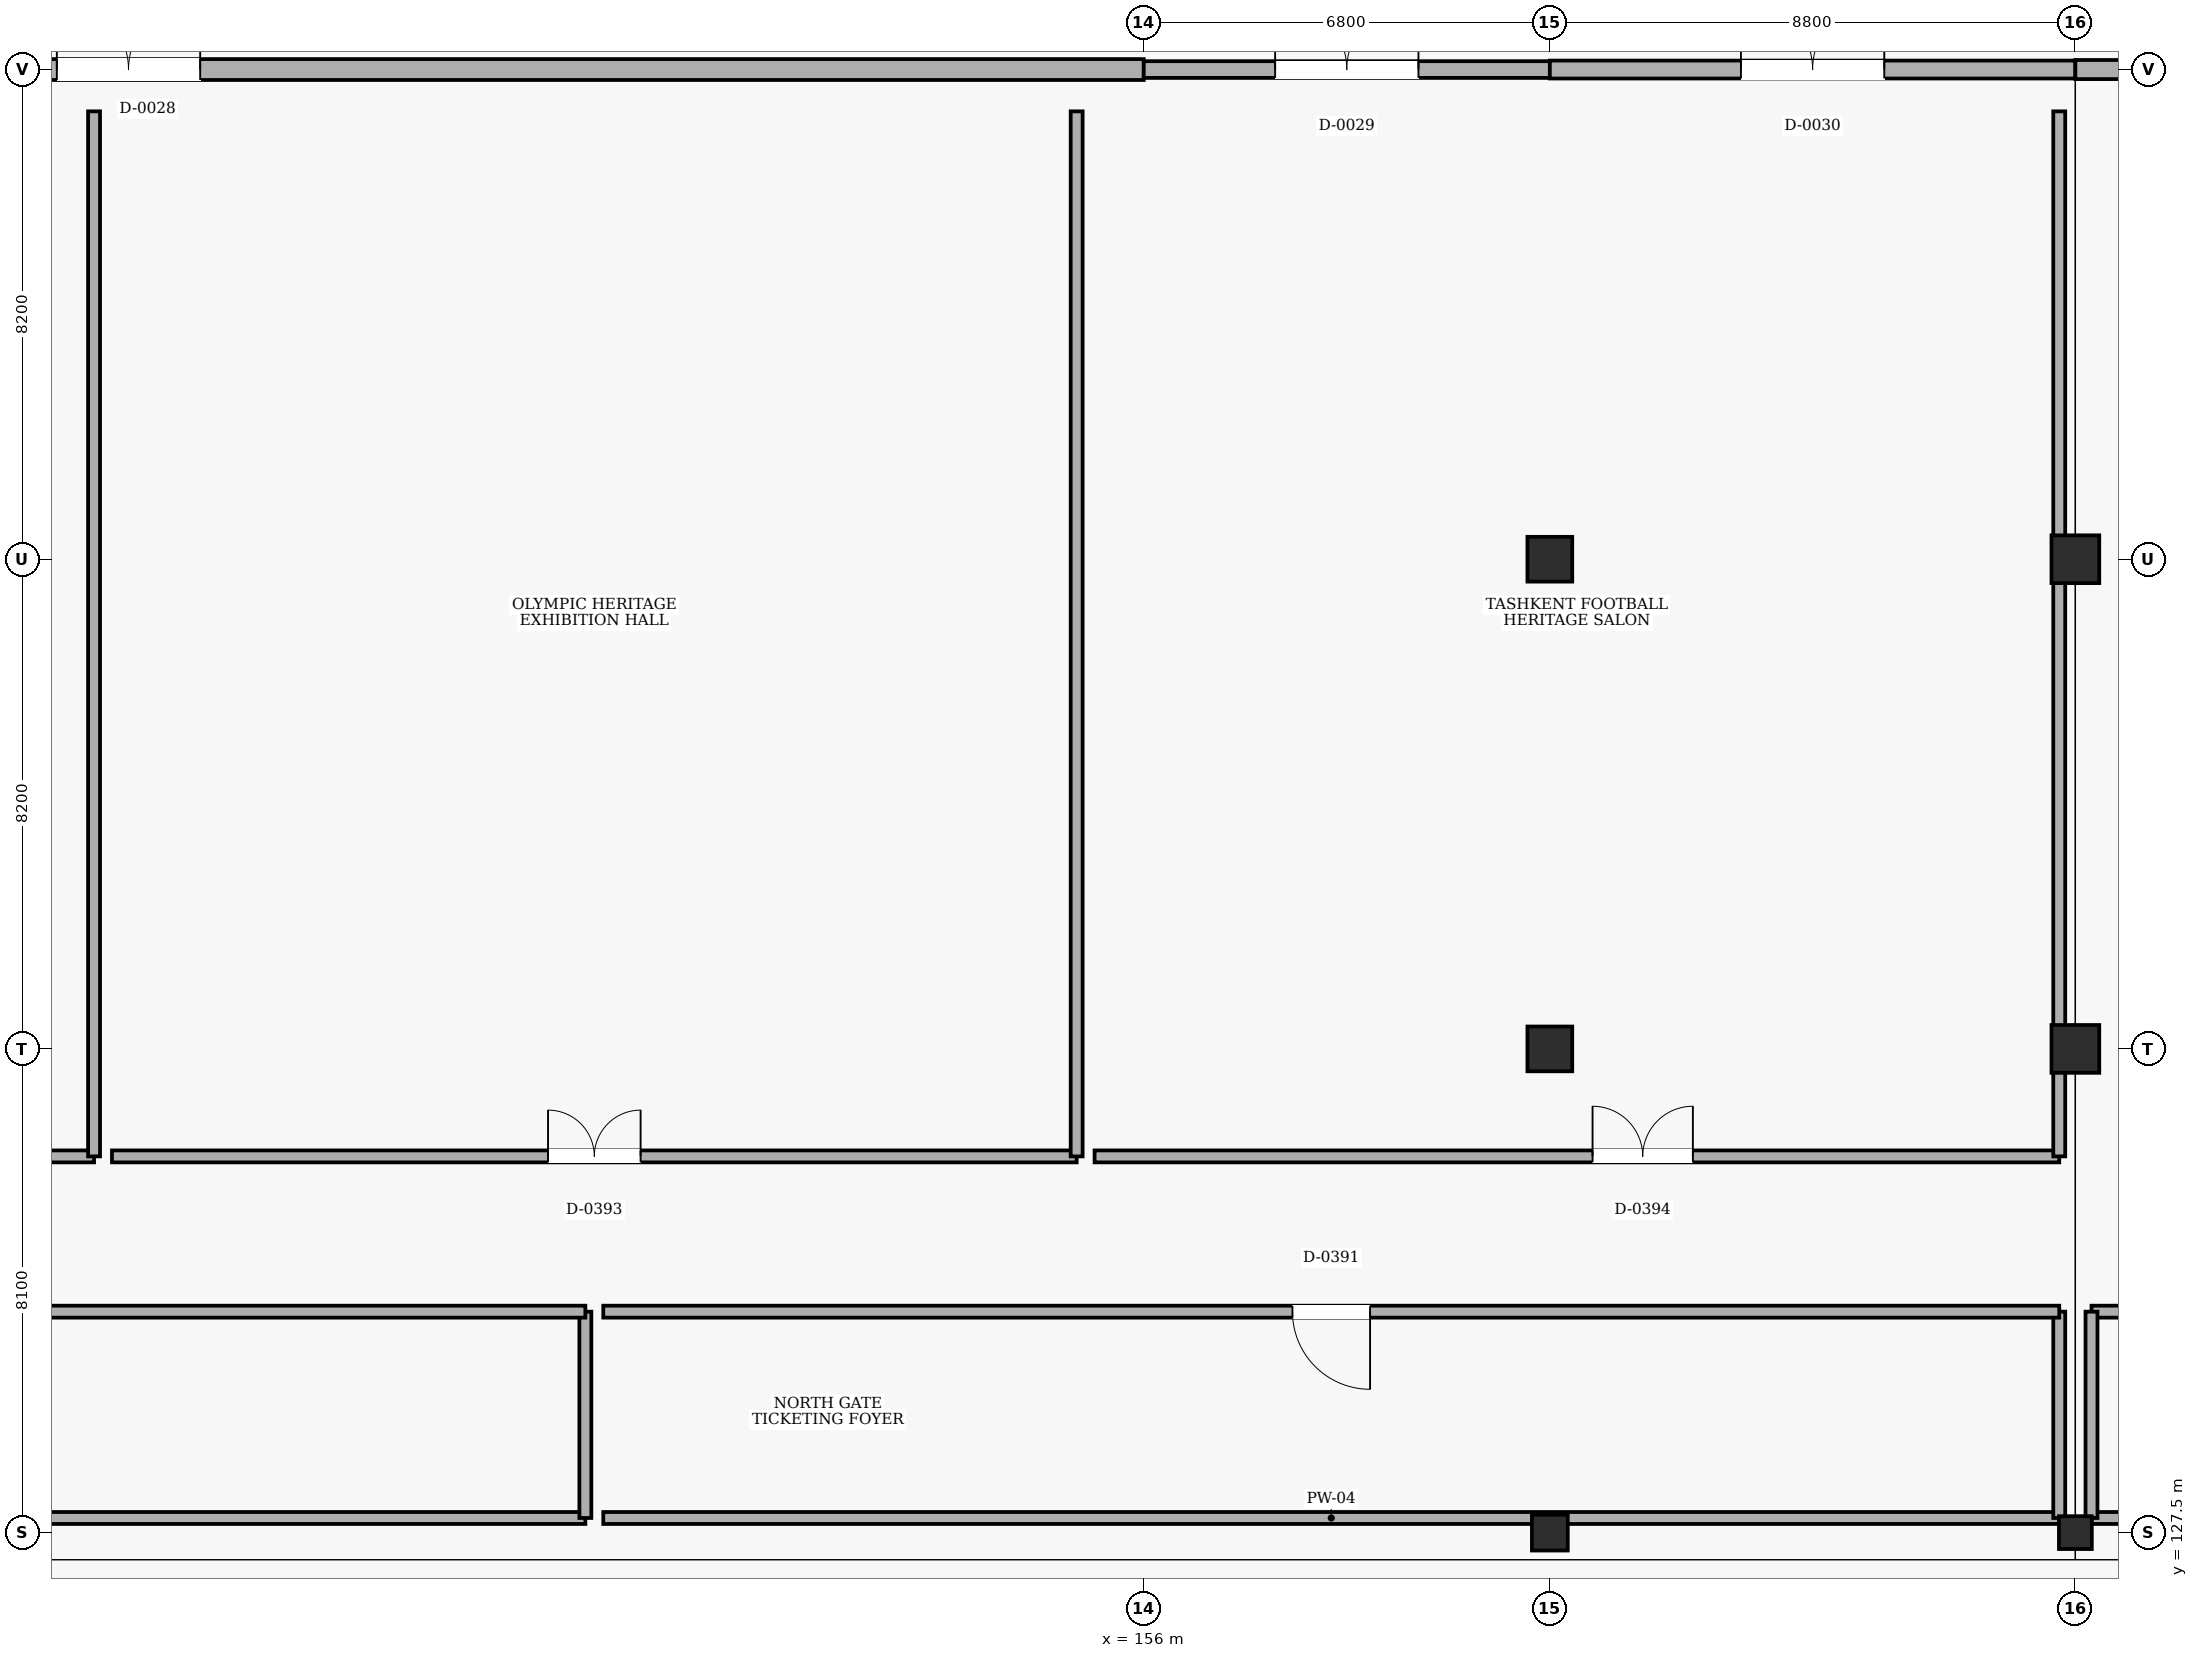
"""IFC4 building model, lengths in metres.
Left out: names, types, materials, properties, quantities, classifications, styles, units other than length and angle.
Written with IfcOpenShell. Run it as: python <this file> out.ifc"""

import sys

from ifc_helpers import new_model, si_unit, direction, frame, frame_2d, origin, origin_2d, place, context, subcontext, project, spatial, rectangle, extrude, element, fill, save


model = new_model("IFC4")
c1 = context("Model", 3, precision=1e-05, world=origin(), true_north=direction((0.0, 1.0)))
c2 = subcontext(c1, "Body", "Model", "MODEL_VIEW")
j1 = project(units=[si_unit("LENGTHUNIT", "METRE"), si_unit("PLANEANGLEUNIT", "RADIAN")], contexts=[c1])
p1 = place(None, origin())
s1 = spatial("IfcSite", under=j1, at=p1, CompositionType="ELEMENT")
p2 = place(p1, origin())
s2 = spatial("IfcBuilding", under=s1, at=p2, CompositionType="ELEMENT")
p3 = place(p2, origin())
s3 = spatial("IfcBuildingStorey", under=s2, at=p3, CompositionType="ELEMENT", Elevation=0.0)
p4 = place(p3, frame((162.8, 127.5, 0.0), z_axis=(0.0, 0.0, 1.0), x_axis=(1.0, 0.0, 0.0)))
e1 = element("IfcColumn", 1, at=p4, inside=s3, PredefinedType="COLUMN", context=c2, shape_type="SweptSolid", body=[
    extrude(rectangle(XDim=0.6, YDim=0.6, at=origin_2d()), origin(), (0.0, 0.0, 1.0), 5.4),
])
for number, where, z_axis, x_axis in (
    (2, (162.8, 135.6, 0.0), (0.0, 0.0, 1.0), (1.0, 0.0, 0.0)),
    (3, (162.8, 143.8, 0.0), (0.0, 0.0, 1.0), (1.0, 0.0, 0.0)),
):
    element("IfcColumn", number, at=place(p3, frame(where, z_axis=z_axis, x_axis=x_axis)), inside=s3, PredefinedType="COLUMN", context=c2, shape_type="SweptSolid", body=[
        extrude(rectangle(XDim=0.75, YDim=0.75, at=origin_2d()), origin(), (0.0, 0.0, 1.0), 5.4),
    ])
p5 = place(p3, frame((171.6, 127.5, 0.0), z_axis=(0.0, 0.0, 1.0), x_axis=(1.0, 0.0, 0.0)))
e4 = element("IfcColumn", 4, at=p5, inside=s3, PredefinedType="COLUMN", context=c2, shape_type="SweptSolid", body=[
    extrude(rectangle(XDim=0.55, YDim=0.55, at=origin_2d()), origin(), (0.0, 0.0, 1.0), 5.4),
])
for number, where, z_axis, x_axis in (
    (5, (171.6, 135.6, 0.0), (0.0, 0.0, 1.0), (1.0, 0.0, 0.0)),
    (6, (171.6, 143.8, 0.0), (0.0, 0.0, 1.0), (1.0, 0.0, 0.0)),
):
    element("IfcColumn", number, at=place(p3, frame(where, z_axis=z_axis, x_axis=x_axis)), inside=s3, PredefinedType="COLUMN", context=c2, shape_type="SweptSolid", body=[
        extrude(rectangle(XDim=0.8, YDim=0.8, at=origin_2d()), origin(), (0.0, 0.0, 1.0), 5.4),
    ])
p6 = place(p3, frame((122.0, 152.0, 0.0), z_axis=(0.0, 0.0, 1.0), x_axis=(1.0, 0.0, 0.0)))
e7 = element("IfcWall", 7, at=p6, inside=s3, PredefinedType="SOLIDWALL", context=c2, shape_type="SweptSolid", body=[
    extrude(rectangle(XDim=34.0, YDim=0.35, at=frame_2d((17.0, 0.0))), origin(), (0.0, 0.0, 1.0), 5.08),
])
p7 = place(p6, frame((15.8, 0.0, 0.0)))
e8 = element("IfcOpeningElement", 8, at=p7, cuts=e7, PredefinedType="OPENING", context=c2, shape_type="SweptSolid", body=[
    extrude(rectangle(XDim=2.4, YDim=2.2, at=frame_2d((1.2, 1.1))), frame((0.0, 0.185, 0.0), z_axis=(0.0, -1.0, 0.0), x_axis=(1.0, 0.0, 0.0)), (0.0, 0.0, 1.0), 0.37),
])
p8 = place(p3, frame((156.0, 152.0, 0.0), z_axis=(0.0, 0.0, 1.0), x_axis=(1.0, 0.0, 0.0)))
e9 = element("IfcWall", 9, at=p8, inside=s3, PredefinedType="SOLIDWALL", context=c2, shape_type="SweptSolid", body=[
    extrude(rectangle(XDim=6.8, YDim=0.28, at=frame_2d((3.4, 0.0))), origin(), (0.0, 0.0, 1.0), 5.08),
])
p9 = place(p8, frame((2.2, 0.0, 0.0)))
e10 = element("IfcOpeningElement", 10, at=p9, cuts=e9, PredefinedType="OPENING", context=c2, shape_type="SweptSolid", body=[
    extrude(rectangle(XDim=2.4, YDim=2.2, at=frame_2d((1.2, 1.1))), frame((0.0, 0.15, 0.0), z_axis=(0.0, -1.0, 0.0), x_axis=(1.0, 0.0, 0.0)), (0.0, 0.0, 1.0), 0.3),
])
p10 = place(p3, frame((162.8, 152.0, 0.0), z_axis=(0.0, 0.0, 1.0), x_axis=(1.0, 0.0, 0.0)))
e11 = element("IfcWall", 11, at=p10, inside=s3, PredefinedType="SOLIDWALL", context=c2, shape_type="SweptSolid", body=[
    extrude(rectangle(XDim=8.8, YDim=0.3, at=frame_2d((4.4, 0.0))), origin(), (0.0, 0.0, 1.0), 5.08),
])
p11 = place(p10, frame((3.2, 0.0, 0.0)))
e12 = element("IfcOpeningElement", 12, at=p11, cuts=e11, PredefinedType="OPENING", context=c2, shape_type="SweptSolid", body=[
    extrude(rectangle(XDim=2.4, YDim=2.2, at=frame_2d((1.2, 1.1))), frame((0.0, 0.16, 0.0), z_axis=(0.0, -1.0, 0.0), x_axis=(1.0, 0.0, 0.0)), (0.0, 0.0, 1.0), 0.32),
])
p12 = place(p3, frame((171.6, 152.0, 0.0), z_axis=(0.0, 0.0, 1.0), x_axis=(1.0, 0.0, 0.0)))
e13 = element("IfcWall", 13, at=p12, inside=s3, PredefinedType="SOLIDWALL", context=c2, shape_type="SweptSolid", body=[
    extrude(rectangle(XDim=8.8, YDim=0.32, at=frame_2d((4.4, 0.0))), origin(), (0.0, 0.0, 1.0), 5.08),
])
p13 = place(p12, frame((3.2, 0.0, 0.0)))
e14 = element("IfcOpeningElement", 14, at=p13, cuts=e13, PredefinedType="OPENING", context=c2, shape_type="SweptSolid", body=[
    extrude(rectangle(XDim=2.4, YDim=2.2, at=frame_2d((1.2, 1.1))), frame((0.0, 0.17, 0.0), z_axis=(0.0, -1.0, 0.0), x_axis=(1.0, 0.0, 0.0)), (0.0, 0.0, 1.0), 0.34),
])
p14 = place(p3, frame((122.27, 127.745, 0.0), z_axis=(0.0, 0.0, 1.0), x_axis=(1.0, 0.0, 0.0)))
e15 = element("IfcWall", 15, at=p14, inside=s3, PredefinedType="PARTITIONING", context=c2, shape_type="SweptSolid", body=[
    extrude(rectangle(XDim=24.38, YDim=0.2, at=frame_2d((12.19, 0.0))), origin(), (0.0, 0.0, 1.0), 5.08),
])
p15 = place(p3, frame((146.65, 127.745, 0.0), z_axis=(0.0, 0.0, 1.0), x_axis=(0.0, 1.0, 0.0)))
e16 = element("IfcWall", 16, at=p15, inside=s3, PredefinedType="PARTITIONING", context=c2, shape_type="SweptSolid", body=[
    extrude(rectangle(XDim=3.455, YDim=0.2, at=frame_2d((1.728, 0.0))), origin(), (0.0, 0.0, 1.0), 5.08),
])
p16 = place(p3, frame((146.65, 131.2, 0.0), z_axis=(0.0, 0.0, 1.0), x_axis=(-1.0, 0.0, 0.0)))
e17 = element("IfcWall", 17, at=p16, inside=s3, PredefinedType="PARTITIONING", context=c2, shape_type="SweptSolid", body=[
    extrude(rectangle(XDim=24.38, YDim=0.2, at=frame_2d((12.19, 0.0))), origin(), (0.0, 0.0, 1.0), 5.08),
])
p17 = place(p16, frame((11.59, 0.0, 0.0)))
e18 = element("IfcOpeningElement", 18, at=p17, cuts=e17, PredefinedType="OPENING", context=c2, shape_type="SweptSolid", body=[
    extrude(rectangle(XDim=1.2, YDim=2.15, at=frame_2d((0.6, 1.075))), frame((0.0, 0.11, 0.0), z_axis=(0.0, -1.0, 0.0), x_axis=(1.0, 0.0, 0.0)), (0.0, 0.0, 1.0), 0.22),
])
p18 = place(p3, frame((146.95, 127.745, 0.0), z_axis=(0.0, 0.0, 1.0), x_axis=(1.0, 0.0, 0.0)))
e19 = element("IfcWall", 19, at=p18, inside=s3, PredefinedType="PARTITIONING", context=c2, shape_type="SweptSolid", body=[
    extrude(rectangle(XDim=24.38, YDim=0.2, at=frame_2d((12.19, 0.0))), origin(), (0.0, 0.0, 1.0), 4.36),
])
p19 = place(p3, frame((171.33, 127.745, 0.0), z_axis=(0.0, 0.0, 1.0), x_axis=(0.0, 1.0, 0.0)))
e20 = element("IfcWall", 20, at=p19, inside=s3, PredefinedType="PARTITIONING", context=c2, shape_type="SweptSolid", body=[
    extrude(rectangle(XDim=3.455, YDim=0.2, at=frame_2d((1.728, 0.0))), origin(), (0.0, 0.0, 1.0), 4.31),
])
p20 = place(p3, frame((171.33, 131.2, 0.0), z_axis=(0.0, 0.0, 1.0), x_axis=(-1.0, 0.0, 0.0)))
e21 = element("IfcWall", 21, at=p20, inside=s3, PredefinedType="PARTITIONING", context=c2, shape_type="SweptSolid", body=[
    extrude(rectangle(XDim=24.38, YDim=0.2, at=frame_2d((12.19, 0.0))), origin(), (0.0, 0.0, 1.0), 5.08),
])
p21 = place(p20, frame((11.54, 0.0, 0.0)))
e22 = element("IfcOpeningElement", 22, at=p21, cuts=e21, PredefinedType="OPENING", context=c2, shape_type="SweptSolid", body=[
    extrude(rectangle(XDim=1.3, YDim=2.2, at=frame_2d((0.65, 1.1))), frame((0.0, 0.11, 0.0), z_axis=(0.0, -1.0, 0.0), x_axis=(1.0, 0.0, 0.0)), (0.0, 0.0, 1.0), 0.22),
])
p22 = place(p3, frame((122.27, 133.8, 0.0), z_axis=(0.0, 0.0, 1.0), x_axis=(1.0, 0.0, 0.0)))
e23 = element("IfcWall", 23, at=p22, inside=s3, PredefinedType="PARTITIONING", context=c2, shape_type="SweptSolid", body=[
    extrude(rectangle(XDim=16.153, YDim=0.2, at=frame_2d((8.077, 0.0))), origin(), (0.0, 0.0, 1.0), 5.08),
])
p23 = place(p22, frame((7.377, 0.0, 0.0)))
e24 = element("IfcOpeningElement", 24, at=p23, cuts=e23, PredefinedType="OPENING", context=c2, shape_type="SweptSolid", body=[
    extrude(rectangle(XDim=1.4, YDim=2.2, at=frame_2d((0.7, 1.1))), frame((0.0, 0.11, 0.0), z_axis=(0.0, -1.0, 0.0), x_axis=(1.0, 0.0, 0.0)), (0.0, 0.0, 1.0), 0.22),
])
p24 = place(p3, frame((138.423, 133.8, 0.0), z_axis=(0.0, 0.0, 1.0), x_axis=(0.0, 1.0, 0.0)))
e25 = element("IfcWall", 25, at=p24, inside=s3, PredefinedType="PARTITIONING", context=c2, shape_type="SweptSolid", body=[
    extrude(rectangle(XDim=17.5, YDim=0.2, at=frame_2d((8.75, 0.0))), origin(), (0.0, 0.0, 1.0), 5.08),
])
p25 = place(p3, frame((138.723, 133.8, 0.0), z_axis=(0.0, 0.0, 1.0), x_axis=(1.0, 0.0, 0.0)))
e26 = element("IfcWall", 26, at=p25, inside=s3, PredefinedType="PARTITIONING", context=c2, shape_type="SweptSolid", body=[
    extrude(rectangle(XDim=16.153, YDim=0.2, at=frame_2d((8.077, 0.0))), origin(), (0.0, 0.0, 1.0), 5.08),
])
p26 = place(p25, frame((7.302, 0.0, 0.0)))
e27 = element("IfcOpeningElement", 27, at=p26, cuts=e26, PredefinedType="OPENING", context=c2, shape_type="SweptSolid", body=[
    extrude(rectangle(XDim=1.55, YDim=2.2, at=frame_2d((0.775, 1.1))), frame((0.0, 0.11, 0.0), z_axis=(0.0, -1.0, 0.0), x_axis=(1.0, 0.0, 0.0)), (0.0, 0.0, 1.0), 0.22),
])
p27 = place(p3, frame((154.877, 133.8, 0.0), z_axis=(0.0, 0.0, 1.0), x_axis=(0.0, 1.0, 0.0)))
e28 = element("IfcWall", 28, at=p27, inside=s3, PredefinedType="PARTITIONING", context=c2, shape_type="SweptSolid", body=[
    extrude(rectangle(XDim=17.5, YDim=0.2, at=frame_2d((8.75, 0.0))), origin(), (0.0, 0.0, 1.0), 5.08),
])
p28 = place(p3, frame((155.177, 133.8, 0.0), z_axis=(0.0, 0.0, 1.0), x_axis=(1.0, 0.0, 0.0)))
e29 = element("IfcWall", 29, at=p28, inside=s3, PredefinedType="PARTITIONING", context=c2, shape_type="SweptSolid", body=[
    extrude(rectangle(XDim=16.153, YDim=0.2, at=frame_2d((8.077, 0.0))), origin(), (0.0, 0.0, 1.0), 5.08),
])
p29 = place(p28, frame((8.338, 0.0, 0.0)))
e30 = element("IfcOpeningElement", 30, at=p29, cuts=e29, PredefinedType="OPENING", context=c2, shape_type="SweptSolid", body=[
    extrude(rectangle(XDim=1.68, YDim=2.25, at=frame_2d((0.84, 1.125))), frame((0.0, 0.11, 0.0), z_axis=(0.0, -1.0, 0.0), x_axis=(1.0, 0.0, 0.0)), (0.0, 0.0, 1.0), 0.22),
])
p30 = place(p3, frame((171.33, 133.8, 0.0), z_axis=(0.0, 0.0, 1.0), x_axis=(0.0, 1.0, 0.0)))
e31 = element("IfcWall", 31, at=p30, inside=s3, PredefinedType="PARTITIONING", context=c2, shape_type="SweptSolid", body=[
    extrude(rectangle(XDim=17.5, YDim=0.2, at=frame_2d((8.75, 0.0))), origin(), (0.0, 0.0, 1.0), 4.31),
])
p31 = place(p3, frame((171.87, 127.745, 0.0), z_axis=(0.0, 0.0, 1.0), x_axis=(1.0, 0.0, 0.0)))
e32 = element("IfcWall", 32, at=p31, inside=s3, PredefinedType="PARTITIONING", context=c2, shape_type="SweptSolid", body=[
    extrude(rectangle(XDim=15.212, YDim=0.2, at=frame_2d((7.606, 0.0))), origin(), (0.0, 0.0, 1.0), 4.26),
])
p32 = place(p3, frame((187.082, 131.2, 0.0), z_axis=(0.0, 0.0, 1.0), x_axis=(-1.0, 0.0, 0.0)))
e33 = element("IfcWall", 33, at=p32, inside=s3, PredefinedType="PARTITIONING", context=c2, shape_type="SweptSolid", body=[
    extrude(rectangle(XDim=15.212, YDim=0.2, at=frame_2d((7.606, 0.0))), origin(), (0.0, 0.0, 1.0), 5.08),
])
p33 = place(p32, frame((6.726, 0.0, 0.0)))
e34 = element("IfcOpeningElement", 34, at=p33, cuts=e33, PredefinedType="OPENING", context=c2, shape_type="SweptSolid", body=[
    extrude(rectangle(XDim=1.76, YDim=2.25, at=frame_2d((0.88, 1.125))), frame((0.0, 0.11, 0.0), z_axis=(0.0, -1.0, 0.0), x_axis=(1.0, 0.0, 0.0)), (0.0, 0.0, 1.0), 0.22),
])
p34 = place(p3, frame((171.87, 131.2, 0.0), z_axis=(0.0, 0.0, 1.0), x_axis=(0.0, -1.0, 0.0)))
e35 = element("IfcWall", 35, at=p34, inside=s3, PredefinedType="PARTITIONING", context=c2, shape_type="SweptSolid", body=[
    extrude(rectangle(XDim=3.455, YDim=0.2, at=frame_2d((1.728, 0.0))), origin(), (0.0, 0.0, 1.0), 4.31),
])
p35 = place(p7, origin())
e36 = element("IfcDoor", 36, at=p35, inside=s3, OperationType="DOUBLE_DOOR_SINGLE_SWING", PredefinedType="DOOR", context=c2, shape_type="SweptSolid", body=[
    extrude(rectangle(XDim=2.4, YDim=2.2, at=frame_2d((1.2, 1.1))), frame((0.0, 0.025, 0.0), z_axis=(0.0, -1.0, 0.0), x_axis=(1.0, 0.0, 0.0)), (0.0, 0.0, 1.0), 0.05),
])
fill(e8, e36)
p36 = place(p9, origin())
e37 = element("IfcDoor", 37, at=p36, inside=s3, OperationType="DOUBLE_DOOR_SINGLE_SWING", PredefinedType="DOOR", context=c2, shape_type="SweptSolid", body=[
    extrude(rectangle(XDim=2.4, YDim=2.2, at=frame_2d((1.2, 1.1))), frame((0.0, 0.025, 0.0), z_axis=(0.0, -1.0, 0.0), x_axis=(1.0, 0.0, 0.0)), (0.0, 0.0, 1.0), 0.05),
])
fill(e10, e37)
p37 = place(p11, origin())
e38 = element("IfcDoor", 38, at=p37, inside=s3, OperationType="DOUBLE_DOOR_SINGLE_SWING", PredefinedType="DOOR", context=c2, shape_type="SweptSolid", body=[
    extrude(rectangle(XDim=2.4, YDim=2.2, at=frame_2d((1.2, 1.1))), frame((0.0, 0.025, 0.0), z_axis=(0.0, -1.0, 0.0), x_axis=(1.0, 0.0, 0.0)), (0.0, 0.0, 1.0), 0.05),
])
fill(e12, e38)
p38 = place(p21, origin())
e39 = element("IfcDoor", 39, at=p38, inside=s3, OperationType="SINGLE_SWING_LEFT", PredefinedType="DOOR", context=c2, shape_type="SweptSolid", body=[
    extrude(rectangle(XDim=1.3, YDim=2.2, at=frame_2d((0.65, 1.1))), frame((0.0, 0.025, 0.0), z_axis=(0.0, -1.0, 0.0), x_axis=(1.0, 0.0, 0.0)), (0.0, 0.0, 1.0), 0.05),
])
fill(e22, e39)
p39 = place(p26, origin())
e40 = element("IfcDoor", 40, at=p39, inside=s3, OperationType="DOUBLE_DOOR_SINGLE_SWING", PredefinedType="DOOR", context=c2, shape_type="SweptSolid", body=[
    extrude(rectangle(XDim=1.55, YDim=2.2, at=frame_2d((0.775, 1.1))), frame((0.0, 0.025, 0.0), z_axis=(0.0, -1.0, 0.0), x_axis=(1.0, 0.0, 0.0)), (0.0, 0.0, 1.0), 0.05),
])
fill(e27, e40)
p40 = place(p29, origin())
e41 = element("IfcDoor", 41, at=p40, inside=s3, OperationType="DOUBLE_DOOR_SINGLE_SWING", PredefinedType="DOOR", context=c2, shape_type="SweptSolid", body=[
    extrude(rectangle(XDim=1.68, YDim=2.25, at=frame_2d((0.84, 1.125))), frame((0.0, 0.025, 0.0), z_axis=(0.0, -1.0, 0.0), x_axis=(1.0, 0.0, 0.0)), (0.0, 0.0, 1.0), 0.05),
])
fill(e30, e41)
save(model, sys.argv[1])
